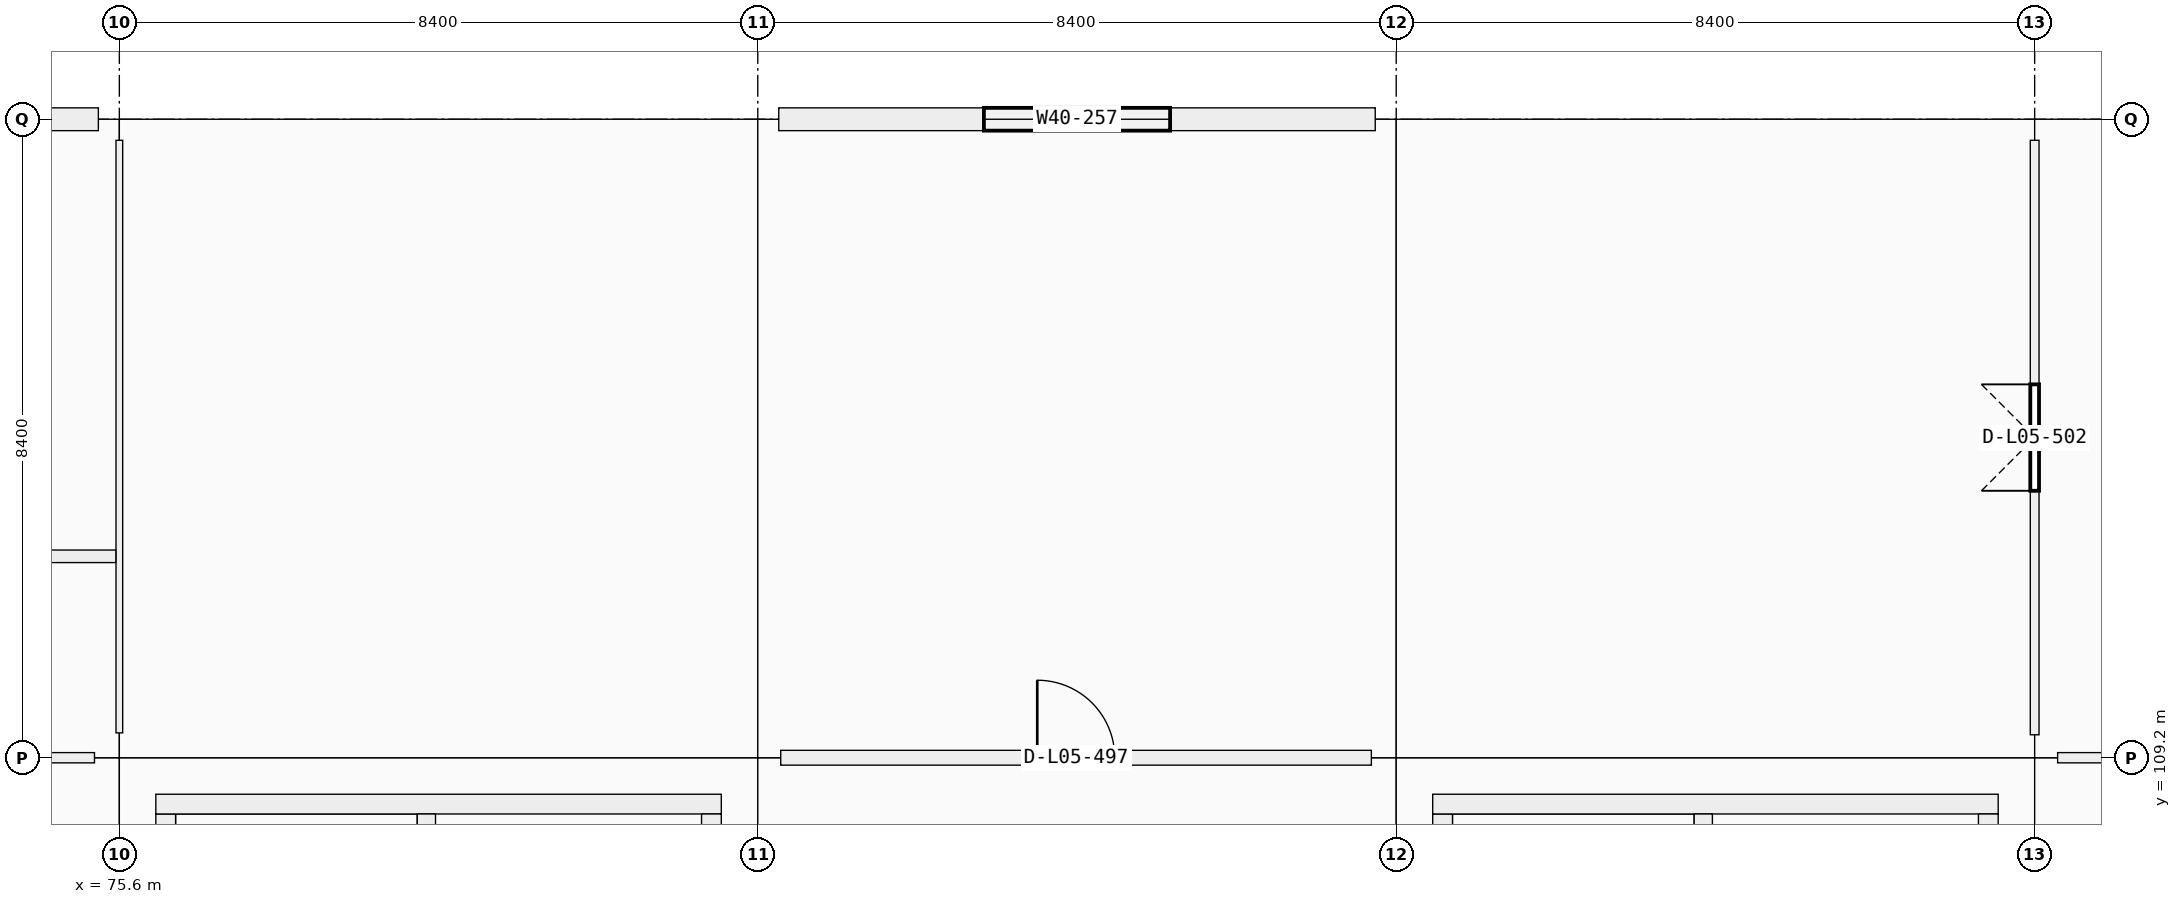
"""IFC4 building model, lengths in metres.
Left out: names, types, materials, properties, quantities, classifications, styles, units other than length and angle.
Written with IfcOpenShell. Run it as: python <this file> out.ifc"""

import sys

from ifc_helpers import new_model, si_unit, direction, frame, frame_2d, origin, origin_2d, place, context, subcontext, project, spatial, rectangle, extrude, element, fill, save


model = new_model("IFC4")
c1 = context("Model", 3, precision=1e-05, world=origin(), true_north=direction((0.0, 1.0)))
c2 = subcontext(c1, "Body", "Model", "MODEL_VIEW")
j1 = project(units=[si_unit("LENGTHUNIT", "METRE"), si_unit("PLANEANGLEUNIT", "RADIAN")], contexts=[c1])
p1 = place(None, origin())
s1 = spatial("IfcSite", under=j1, at=p1, CompositionType="ELEMENT")
p2 = place(p1, origin())
s2 = spatial("IfcBuilding", under=s1, at=p2, CompositionType="ELEMENT")
p3 = place(p2, frame((0.0, 0.0, 23.4)))
s3 = spatial("IfcBuildingStorey", under=s2, at=p3, CompositionType="ELEMENT", Elevation=23.4)
p4 = place(p3, frame((75.6, 109.2, 0.0), z_axis=(0.0, 0.0, 1.0), x_axis=(1.0, 0.0, 0.0)))
e1 = element("IfcColumn", 1, at=p4, inside=s3, PredefinedType="COLUMN", context=c2, shape_type="SweptSolid", body=[
    extrude(rectangle(XDim=0.65, YDim=0.65, at=origin_2d()), origin(), (0.0, 0.0, 1.0), 4.32),
])
p5 = place(p3, frame((75.6, 117.6, 0.0), z_axis=(0.0, 0.0, 1.0), x_axis=(1.0, 0.0, 0.0)))
e2 = element("IfcColumn", 2, at=p5, inside=s3, PredefinedType="COLUMN", context=c2, shape_type="SweptSolid", body=[
    extrude(rectangle(XDim=0.55, YDim=0.55, at=origin_2d()), origin(), (0.0, 0.0, 1.0), 4.07),
])
p6 = place(p3, frame((84.0, 109.2, 0.0), z_axis=(0.0, 0.0, 1.0), x_axis=(1.0, 0.0, 0.0)))
e3 = element("IfcColumn", 3, at=p6, inside=s3, PredefinedType="COLUMN", context=c2, shape_type="SweptSolid", body=[
    extrude(rectangle(XDim=0.6, YDim=0.6, at=origin_2d()), origin(), (0.0, 0.0, 1.0), 4.32),
])
p7 = place(p3, frame((84.0, 117.6, 0.0), z_axis=(0.0, 0.0, 1.0), x_axis=(1.0, 0.0, 0.0)))
e4 = element("IfcColumn", 4, at=p7, inside=s3, PredefinedType="COLUMN", context=c2, shape_type="SweptSolid", body=[
    extrude(rectangle(XDim=0.55, YDim=0.55, at=origin_2d()), origin(), (0.0, 0.0, 1.0), 4.07),
])
p8 = place(p3, frame((92.4, 109.2, 0.0), z_axis=(0.0, 0.0, 1.0), x_axis=(1.0, 0.0, 0.0)))
e5 = element("IfcColumn", 5, at=p8, inside=s3, PredefinedType="COLUMN", context=c2, shape_type="SweptSolid", body=[
    extrude(rectangle(XDim=0.65, YDim=0.65, at=origin_2d()), origin(), (0.0, 0.0, 1.0), 4.32),
])
p9 = place(p3, frame((92.4, 117.6, 0.0), z_axis=(0.0, 0.0, 1.0), x_axis=(1.0, 0.0, 0.0)))
e6 = element("IfcColumn", 6, at=p9, inside=s3, PredefinedType="COLUMN", context=c2, shape_type="SweptSolid", body=[
    extrude(rectangle(XDim=0.55, YDim=0.55, at=origin_2d()), origin(), (0.0, 0.0, 1.0), 4.07),
])
p10 = place(p3, frame((100.8, 109.2, 0.0), z_axis=(0.0, 0.0, 1.0), x_axis=(1.0, 0.0, 0.0)))
e7 = element("IfcColumn", 7, at=p10, inside=s3, PredefinedType="COLUMN", context=c2, shape_type="SweptSolid", body=[
    extrude(rectangle(XDim=0.6, YDim=0.6, at=origin_2d()), origin(), (0.0, 0.0, 1.0), 4.32),
])
p11 = place(p3, frame((100.8, 117.6, 0.0), z_axis=(0.0, 0.0, 1.0), x_axis=(1.0, 0.0, 0.0)))
e8 = element("IfcColumn", 8, at=p11, inside=s3, PredefinedType="COLUMN", context=c2, shape_type="SweptSolid", body=[
    extrude(rectangle(XDim=0.55, YDim=0.55, at=origin_2d()), origin(), (0.0, 0.0, 1.0), 4.07),
])
p12 = place(p3, frame((67.476, 117.6, 0.0), z_axis=(0.0, 0.0, 1.0), x_axis=(1.0, 0.0, 0.0)))
e9 = element("IfcWall", 9, at=p12, inside=s3, PredefinedType="SOLIDWALL", context=c2, shape_type="SweptSolid", body=[
    extrude(rectangle(XDim=7.848, YDim=0.3, at=frame_2d((3.924, 0.0))), origin(), (0.0, 0.0, 1.0), 3.37),
])
p13 = place(p12, frame((3.149, 0.0, 0.9)))
e10 = element("IfcOpeningElement", 10, at=p13, cuts=e9, PredefinedType="OPENING", context=c2, shape_type="SweptSolid", body=[
    extrude(rectangle(XDim=1.55, YDim=1.6, at=frame_2d((0.775, 0.8))), frame((0.0, 0.15, 0.0), z_axis=(0.0, -1.0, 0.0), x_axis=(1.0, 0.0, 0.0)), (0.0, 0.0, 1.0), 0.3),
])
p14 = place(p3, frame((84.276, 117.6, 0.0), z_axis=(0.0, 0.0, 1.0), x_axis=(1.0, 0.0, 0.0)))
e11 = element("IfcWall", 11, at=p14, inside=s3, PredefinedType="SOLIDWALL", context=c2, shape_type="SweptSolid", body=[
    extrude(rectangle(XDim=7.848, YDim=0.3, at=frame_2d((3.924, 0.0))), origin(), (0.0, 0.0, 1.0), 3.37),
])
p15 = place(p14, frame((2.699, 0.0, 0.9)))
e12 = element("IfcOpeningElement", 12, at=p15, cuts=e11, PredefinedType="OPENING", context=c2, shape_type="SweptSolid", body=[
    extrude(rectangle(XDim=2.45, YDim=1.45, at=frame_2d((1.225, 0.725))), frame((0.0, 0.15, 0.0), z_axis=(0.0, -1.0, 0.0), x_axis=(1.0, 0.0, 0.0)), (0.0, 0.0, 1.0), 0.3),
])
p16 = place(p3, frame((76.21, 101.54, 0.0), z_axis=(0.0, 0.0, 1.0), x_axis=(0.0, 1.0, 0.0)))
e13 = element("IfcWall", 13, at=p16, inside=s3, PredefinedType="SHEAR", context=c2, shape_type="SweptSolid", body=[
    extrude(rectangle(XDim=6.92, YDim=0.26, at=frame_2d((3.46, 0.0))), origin(), (0.0, 0.0, 1.0), 4.32),
])
p17 = place(p3, frame((76.08, 108.59, 0.0), z_axis=(0.0, 0.0, 1.0), x_axis=(1.0, 0.0, 0.0)))
e14 = element("IfcWall", 14, at=p17, inside=s3, PredefinedType="SHEAR", context=c2, shape_type="SweptSolid", body=[
    extrude(rectangle(XDim=7.44, YDim=0.26, at=frame_2d((3.72, 0.0))), origin(), (0.0, 0.0, 1.0), 4.32),
])
p18 = place(p3, frame((83.39, 108.46, 0.0), z_axis=(0.0, 0.0, 1.0), x_axis=(0.0, -1.0, 0.0)))
e15 = element("IfcWall", 15, at=p18, inside=s3, PredefinedType="SHEAR", context=c2, shape_type="SweptSolid", body=[
    extrude(rectangle(XDim=6.92, YDim=0.26, at=frame_2d((3.46, 0.0))), origin(), (0.0, 0.0, 1.0), 4.32),
])
p19 = place(p18, frame((4.01, 0.0, 0.0)))
e16 = element("IfcOpeningElement", 16, at=p19, cuts=e15, PredefinedType="OPENING", context=c2, shape_type="SweptSolid", body=[
    extrude(rectangle(XDim=1.5, YDim=2.15, at=frame_2d((0.75, 1.075))), frame((0.0, 0.13, 0.0), z_axis=(0.0, -1.0, 0.0), x_axis=(1.0, 0.0, 0.0)), (0.0, 0.0, 1.0), 0.26),
])
p20 = place(p3, frame((79.64, 101.54, 0.0), z_axis=(0.0, 0.0, 1.0), x_axis=(0.0, 1.0, 0.0)))
e17 = element("IfcWall", 17, at=p20, inside=s3, PredefinedType="SHEAR", context=c2, shape_type="SweptSolid", body=[
    extrude(rectangle(XDim=6.92, YDim=0.24, at=frame_2d((3.46, 0.0))), origin(), (0.0, 0.0, 1.0), 4.32),
])
p21 = place(p20, frame((0.12, 0.0, 0.0)))
e18 = element("IfcOpeningElement", 18, at=p21, cuts=e17, PredefinedType="OPENING", context=c2, shape_type="SweptSolid", body=[
    extrude(rectangle(XDim=1.0, YDim=2.15, at=frame_2d((0.5, 1.075))), frame((0.0, 0.12, 0.0), z_axis=(0.0, -1.0, 0.0), x_axis=(1.0, 0.0, 0.0)), (0.0, 0.0, 1.0), 0.24),
])
p22 = place(p3, frame((93.01, 101.54, 0.0), z_axis=(0.0, 0.0, 1.0), x_axis=(0.0, 1.0, 0.0)))
e19 = element("IfcWall", 19, at=p22, inside=s3, PredefinedType="SHEAR", context=c2, shape_type="SweptSolid", body=[
    extrude(rectangle(XDim=6.92, YDim=0.26, at=frame_2d((3.46, 0.0))), origin(), (0.0, 0.0, 1.0), 4.32),
])
p23 = place(p3, frame((92.88, 108.59, 0.0), z_axis=(0.0, 0.0, 1.0), x_axis=(1.0, 0.0, 0.0)))
e20 = element("IfcWall", 20, at=p23, inside=s3, PredefinedType="SHEAR", context=c2, shape_type="SweptSolid", body=[
    extrude(rectangle(XDim=7.44, YDim=0.26, at=frame_2d((3.72, 0.0))), origin(), (0.0, 0.0, 1.0), 4.32),
])
p24 = place(p3, frame((100.19, 108.46, 0.0), z_axis=(0.0, 0.0, 1.0), x_axis=(0.0, -1.0, 0.0)))
e21 = element("IfcWall", 21, at=p24, inside=s3, PredefinedType="SHEAR", context=c2, shape_type="SweptSolid", body=[
    extrude(rectangle(XDim=6.92, YDim=0.26, at=frame_2d((3.46, 0.0))), origin(), (0.0, 0.0, 1.0), 4.32),
])
p25 = place(p24, frame((4.01, 0.0, 0.0)))
e22 = element("IfcOpeningElement", 22, at=p25, cuts=e21, PredefinedType="OPENING", context=c2, shape_type="SweptSolid", body=[
    extrude(rectangle(XDim=1.5, YDim=2.15, at=frame_2d((0.75, 1.075))), frame((0.0, 0.13, 0.0), z_axis=(0.0, -1.0, 0.0), x_axis=(1.0, 0.0, 0.0)), (0.0, 0.0, 1.0), 0.26),
])
p26 = place(p3, frame((96.44, 101.54, 0.0), z_axis=(0.0, 0.0, 1.0), x_axis=(0.0, 1.0, 0.0)))
e23 = element("IfcWall", 23, at=p26, inside=s3, PredefinedType="SHEAR", context=c2, shape_type="SweptSolid", body=[
    extrude(rectangle(XDim=6.92, YDim=0.24, at=frame_2d((3.46, 0.0))), origin(), (0.0, 0.0, 1.0), 4.32),
])
p27 = place(p26, frame((0.12, 0.0, 0.0)))
e24 = element("IfcOpeningElement", 24, at=p27, cuts=e23, PredefinedType="OPENING", context=c2, shape_type="SweptSolid", body=[
    extrude(rectangle(XDim=1.0, YDim=2.15, at=frame_2d((0.5, 1.075))), frame((0.0, 0.12, 0.0), z_axis=(0.0, -1.0, 0.0), x_axis=(1.0, 0.0, 0.0)), (0.0, 0.0, 1.0), 0.24),
])
p28 = place(p3, frame((67.502, 109.2, 0.0), z_axis=(0.0, 0.0, 1.0), x_axis=(1.0, 0.0, 0.0)))
e25 = element("IfcWall", 25, at=p28, inside=s3, PredefinedType="PARTITIONING", context=c2, shape_type="SweptSolid", body=[
    extrude(rectangle(XDim=7.771, YDim=0.135, at=frame_2d((3.885, 0.0))), origin(), (0.0, 0.0, 1.0), 3.19),
])
p29 = place(p3, frame((84.302, 109.2, 0.0), z_axis=(0.0, 0.0, 1.0), x_axis=(1.0, 0.0, 0.0)))
e26 = element("IfcWall", 26, at=p29, inside=s3, PredefinedType="PARTITIONING", context=c2, shape_type="SweptSolid", body=[
    extrude(rectangle(XDim=7.771, YDim=0.195, at=frame_2d((3.885, 0.0))), origin(), (0.0, 0.0, 1.0), 3.19),
])
p30 = place(p29, frame((3.375, 0.0, 0.0)))
e27 = element("IfcOpeningElement", 27, at=p30, cuts=e26, PredefinedType="OPENING", context=c2, shape_type="SweptSolid", body=[
    extrude(rectangle(XDim=1.02, YDim=2.2, at=frame_2d((0.51, 1.1))), frame((0.0, 0.098, 0.0), z_axis=(0.0, -1.0, 0.0), x_axis=(1.0, 0.0, 0.0)), (0.0, 0.0, 1.0), 0.195),
])
p31 = place(p3, frame((101.102, 109.2, 0.0), z_axis=(0.0, 0.0, 1.0), x_axis=(1.0, 0.0, 0.0)))
e28 = element("IfcWall", 28, at=p31, inside=s3, PredefinedType="PARTITIONING", context=c2, shape_type="SweptSolid", body=[
    extrude(rectangle(XDim=7.771, YDim=0.135, at=frame_2d((3.885, 0.0))), origin(), (0.0, 0.0, 1.0), 3.19),
])
p32 = place(p31, frame((3.035, 0.0, 0.0)))
e29 = element("IfcOpeningElement", 29, at=p32, cuts=e28, PredefinedType="OPENING", context=c2, shape_type="SweptSolid", body=[
    extrude(rectangle(XDim=1.7, YDim=2.35, at=frame_2d((0.85, 1.175))), frame((0.0, 0.067, 0.0), z_axis=(0.0, -1.0, 0.0), x_axis=(1.0, 0.0, 0.0)), (0.0, 0.0, 1.0), 0.135),
])
p33 = place(p3, frame((75.6, 109.527, 0.0), z_axis=(0.0, 0.0, 1.0), x_axis=(0.0, 1.0, 0.0)))
e30 = element("IfcWall", 30, at=p33, inside=s3, PredefinedType="PARTITIONING", context=c2, shape_type="SweptSolid", body=[
    extrude(rectangle(XDim=7.796, YDim=0.088, at=frame_2d((3.898, 0.0))), origin(), (0.0, 0.0, 1.0), 3.19),
])
p34 = place(p3, frame((100.8, 109.502, 0.0), z_axis=(0.0, 0.0, 1.0), x_axis=(0.0, 1.0, 0.0)))
e31 = element("IfcWall", 31, at=p34, inside=s3, PredefinedType="PARTITIONING", context=c2, shape_type="SweptSolid", body=[
    extrude(rectangle(XDim=7.821, YDim=0.115, at=frame_2d((3.911, 0.0))), origin(), (0.0, 0.0, 1.0), 3.19),
])
p35 = place(p34, frame((3.21, 0.0, 0.0)))
e32 = element("IfcOpeningElement", 32, at=p35, cuts=e31, PredefinedType="OPENING", context=c2, shape_type="SweptSolid", body=[
    extrude(rectangle(XDim=1.4, YDim=2.25, at=frame_2d((0.7, 1.125))), frame((0.0, 0.058, 0.0), z_axis=(0.0, -1.0, 0.0), x_axis=(1.0, 0.0, 0.0)), (0.0, 0.0, 1.0), 0.115),
])
p36 = place(p3, frame((67.26, 111.85, 0.0), z_axis=(0.0, 0.0, 1.0), x_axis=(1.0, 0.0, 0.0)))
e33 = element("IfcWall", 33, at=p36, inside=s3, PredefinedType="PARTITIONING", context=c2, shape_type="SweptSolid", body=[
    extrude(rectangle(XDim=8.294, YDim=0.165, at=frame_2d((4.147, 0.0))), origin(), (0.0, 0.0, 1.0), 3.19),
])
p37 = place(p15, origin())
e34 = element("IfcWindow", 34, at=p37, inside=s3, PartitioningType="SINGLE_PANEL", PredefinedType="WINDOW", context=c2, shape_type="SweptSolid", body=[
    extrude(rectangle(XDim=2.45, YDim=1.45, at=frame_2d((1.225, 0.725))), frame((0.0, 0.03, 0.0), z_axis=(0.0, -1.0, 0.0), x_axis=(1.0, 0.0, 0.0)), (0.0, 0.0, 1.0), 0.06),
])
fill(e12, e34)
p38 = place(p30, origin())
e35 = element("IfcDoor", 35, at=p38, inside=s3, OperationType="SINGLE_SWING_LEFT", PredefinedType="DOOR", context=c2, shape_type="SweptSolid", body=[
    extrude(rectangle(XDim=1.02, YDim=2.2, at=frame_2d((0.51, 1.1))), frame((0.0, 0.025, 0.0), z_axis=(0.0, -1.0, 0.0), x_axis=(1.0, 0.0, 0.0)), (0.0, 0.0, 1.0), 0.05),
])
fill(e27, e35)
p39 = place(p35, origin())
e36 = element("IfcDoor", 36, at=p39, inside=s3, OperationType="DOUBLE_DOOR_SINGLE_SWING", PredefinedType="DOOR", context=c2, shape_type="SweptSolid", body=[
    extrude(rectangle(XDim=1.4, YDim=2.25, at=frame_2d((0.7, 1.125))), frame((0.0, 0.025, 0.0), z_axis=(0.0, -1.0, 0.0), x_axis=(1.0, 0.0, 0.0)), (0.0, 0.0, 1.0), 0.05),
])
fill(e32, e36)
save(model, sys.argv[1])
